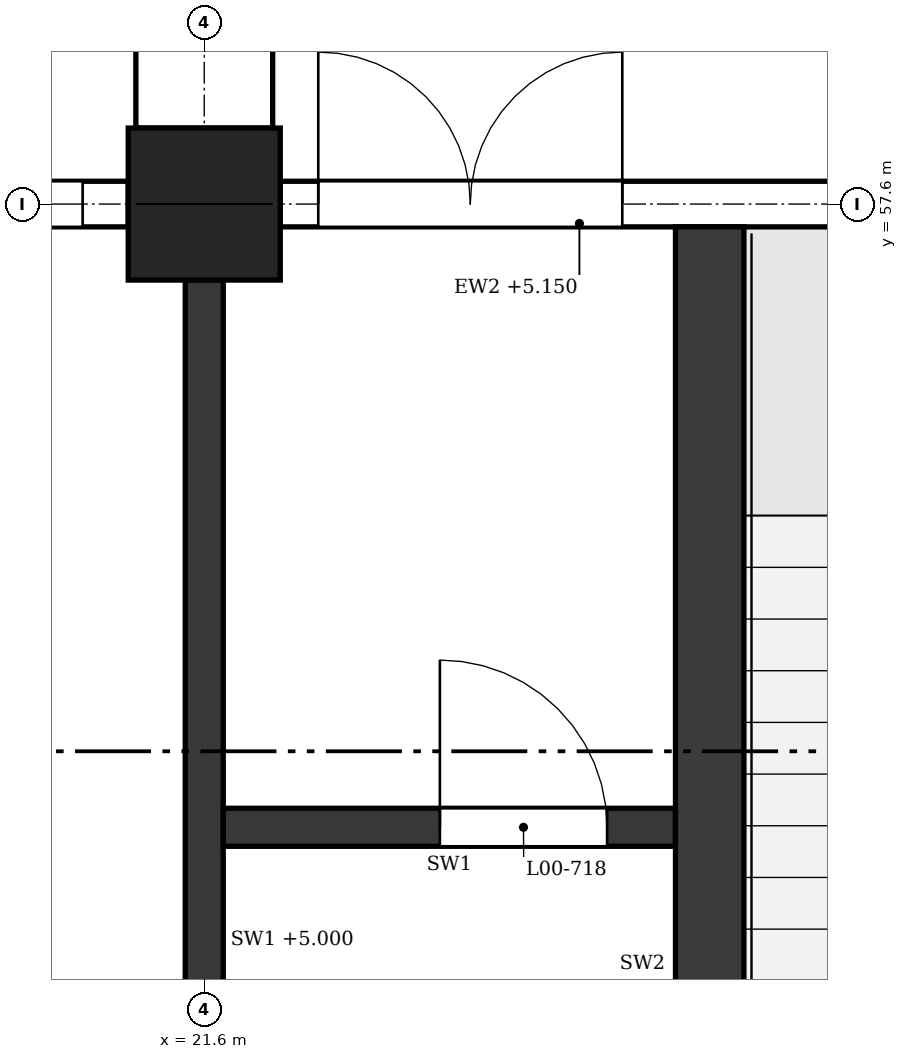
"""IFC4 building model, lengths in metres.
Left out: names, types, materials, properties, quantities, classifications, styles, units other than length and angle.
Written with IfcOpenShell. Run it as: python <this file> out.ifc"""

import sys

from ifc_helpers import new_model, si_unit, direction, frame, frame_2d, origin, origin_2d, place, context, subcontext, project, spatial, polyline, rectangle, outline, extrude, element, fill, save


model = new_model("IFC4")
c1 = context("Model", 3, precision=1e-05, world=origin(), true_north=direction((0.0, 1.0)))
c2 = subcontext(c1, "Body", "Model", "MODEL_VIEW")
j1 = project(units=[si_unit("LENGTHUNIT", "METRE"), si_unit("PLANEANGLEUNIT", "RADIAN")], contexts=[c1])
p1 = place(None, origin())
s1 = spatial("IfcSite", under=j1, at=p1, CompositionType="ELEMENT")
p2 = place(p1, origin())
s2 = spatial("IfcBuilding", under=s1, at=p2, CompositionType="ELEMENT")
p3 = place(p2, origin())
s3 = spatial("IfcBuildingStorey", under=s2, at=p3, CompositionType="ELEMENT", Elevation=0.0)
p4 = place(p3, frame((21.6, 57.6, 0.0), z_axis=(0.0, 0.0, 1.0), x_axis=(1.0, 0.0, 0.0)))
e1 = element("IfcColumn", 1, at=p4, inside=s3, PredefinedType="COLUMN", context=c2, shape_type="SweptSolid", body=[
    extrude(rectangle(XDim=1.0, YDim=1.0, at=origin_2d()), origin(), (0.0, 0.0, 1.0), 6.0),
])
p5 = place(p3, frame((28.3, 57.6, 0.0), z_axis=(0.0, 0.0, 1.0), x_axis=(-1.0, 0.0, 0.0)))
e2 = element("IfcWall", 2, at=p5, inside=s3, PredefinedType="STANDARD", context=c2, shape_type="SweptSolid", body=[
    extrude(rectangle(XDim=6.2, YDim=0.3, at=frame_2d((3.1, 0.0))), origin(), (0.0, 0.0, 1.0), 5.15),
])
p6 = place(p5, frame((3.95, 0.0, 0.0)))
e3 = element("IfcOpeningElement", 3, at=p6, cuts=e2, PredefinedType="OPENING", context=c2, shape_type="SweptSolid", body=[
    extrude(rectangle(XDim=2.0, YDim=2.1, at=frame_2d((1.0, 1.05))), frame((0.0, 0.16, 0.0), z_axis=(0.0, -1.0, 0.0), x_axis=(1.0, 0.0, 0.0)), (0.0, 0.0, 1.0), 0.32),
])
p7 = place(p5, frame((0.85, 0.0, 0.9)))
e4 = element("IfcOpeningElement", 4, at=p7, cuts=e2, PredefinedType="OPENING", context=c2, shape_type="SweptSolid", body=[
    extrude(outline(polyline([(0.0, 0.0), (0.9, 0.0), (0.9, 3.55), (0.45, 4.0), (0.0, 3.55), (0.0, 0.0)])), frame((0.0, 0.16, 0.0), z_axis=(0.0, -1.0, 0.0), x_axis=(1.0, 0.0, 0.0)), (0.0, 0.0, 1.0), 0.32),
])
p8 = place(p3, frame((21.1, 57.6, 0.0), z_axis=(0.0, 0.0, 1.0), x_axis=(-1.0, 0.0, 0.0)))
e5 = element("IfcWall", 5, at=p8, inside=s3, PredefinedType="STANDARD", context=c2, shape_type="SweptSolid", body=[
    extrude(rectangle(XDim=6.2, YDim=0.3, at=frame_2d((3.1, 0.0))), origin(), (0.0, 0.0, 1.0), 5.15),
])
p9 = place(p8, frame((0.3, 0.0, 0.9)))
e6 = element("IfcOpeningElement", 6, at=p9, cuts=e5, PredefinedType="OPENING", context=c2, shape_type="SweptSolid", body=[
    extrude(outline(polyline([(0.0, 0.0), (0.85, 0.0), (0.85, 3.55), (0.425, 4.0), (0.0, 3.55), (0.0, 0.0)])), frame((0.0, 0.16, 0.0), z_axis=(0.0, -1.0, 0.0), x_axis=(1.0, 0.0, 0.0)), (0.0, 0.0, 1.0), 0.32),
])
p10 = place(p8, frame((1.45, 0.0, 0.9)))
e7 = element("IfcOpeningElement", 7, at=p10, cuts=e5, PredefinedType="OPENING", context=c2, shape_type="SweptSolid", body=[
    extrude(outline(polyline([(0.0, 0.0), (0.85, 0.0), (0.85, 3.55), (0.425, 4.0), (0.0, 3.55), (0.0, 0.0)])), frame((0.0, 0.16, 0.0), z_axis=(0.0, -1.0, 0.0), x_axis=(1.0, 0.0, 0.0)), (0.0, 0.0, 1.0), 0.32),
])
p11 = place(p8, frame((3.9, 0.0, 0.9)))
e8 = element("IfcOpeningElement", 8, at=p11, cuts=e5, PredefinedType="OPENING", context=c2, shape_type="SweptSolid", body=[
    extrude(outline(polyline([(0.0, 0.0), (0.85, 0.0), (0.85, 3.55), (0.425, 4.0), (0.0, 3.55), (0.0, 0.0)])), frame((0.0, 0.16, 0.0), z_axis=(0.0, -1.0, 0.0), x_axis=(1.0, 0.0, 0.0)), (0.0, 0.0, 1.0), 0.32),
])
p12 = place(p8, frame((5.05, 0.0, 0.9)))
e9 = element("IfcOpeningElement", 9, at=p12, cuts=e5, PredefinedType="OPENING", context=c2, shape_type="SweptSolid", body=[
    extrude(outline(polyline([(0.0, 0.0), (0.85, 0.0), (0.85, 3.55), (0.425, 4.0), (0.0, 3.55), (0.0, 0.0)])), frame((0.0, 0.16, 0.0), z_axis=(0.0, -1.0, 0.0), x_axis=(1.0, 0.0, 0.0)), (0.0, 0.0, 1.0), 0.32),
])
p13 = place(p3, frame((21.6, 58.1, 0.0), z_axis=(0.0, 0.0, 1.0), x_axis=(0.0, 1.0, 0.0)))
e10 = element("IfcWall", 10, at=p13, inside=s3, PredefinedType="POLYGONAL", context=c2, shape_type="SweptSolid", body=[
    extrude(outline(polyline([(1.6, 0.0), (1.6, 20.9), (1.3, 21.35), (0.0, 21.35), (0.0, 0.0), (1.6, 0.0)])), frame((0.0, 0.45, 0.0), z_axis=(0.0, -1.0, 0.0), x_axis=(1.0, 0.0, 0.0)), (0.0, 0.0, 1.0), 0.9),
])
p14 = place(p3, frame((21.6, 50.9, 0.0), z_axis=(0.0, 0.0, 1.0), x_axis=(0.0, 1.0, 0.0)))
e11 = element("IfcWall", 11, at=p14, inside=s3, PredefinedType="SHEAR", context=c2, shape_type="SweptSolid", body=[
    extrude(rectangle(XDim=6.2, YDim=0.25, at=frame_2d((3.1, 0.0))), origin(), (0.0, 0.0, 1.0), 5.0),
])
p15 = place(p3, frame((24.925, 50.525, 0.0), z_axis=(0.0, 0.0, 1.0), x_axis=(0.0, 1.0, 0.0)))
e12 = element("IfcWall", 12, at=p15, inside=s3, PredefinedType="SHEAR", context=c2, shape_type="SweptSolid", body=[
    extrude(rectangle(XDim=6.925, YDim=0.45, at=frame_2d((3.462, 0.0))), origin(), (0.0, 0.0, 1.0), 5.75),
])
p16 = place(p15, frame((0.525, 0.0, 0.0)))
e13 = element("IfcOpeningElement", 13, at=p16, cuts=e12, PredefinedType="OPENING", context=c2, shape_type="SweptSolid", body=[
    extrude(rectangle(XDim=1.0, YDim=2.1, at=frame_2d((0.5, 1.05))), frame((0.0, 0.235, 0.0), z_axis=(0.0, -1.0, 0.0), x_axis=(1.0, 0.0, 0.0)), (0.0, 0.0, 1.0), 0.47),
])
p17 = place(p3, frame((21.725, 53.5, 0.0), z_axis=(0.0, 0.0, 1.0), x_axis=(1.0, 0.0, 0.0)))
e14 = element("IfcWall", 14, at=p17, inside=s3, PredefinedType="SHEAR", context=c2, shape_type="SweptSolid", body=[
    extrude(rectangle(XDim=2.975, YDim=0.25, at=frame_2d((1.487, 0.0))), origin(), (0.0, 0.0, 1.0), 5.75),
])
p18 = place(p17, frame((1.425, 0.0, 0.0)))
e15 = element("IfcOpeningElement", 15, at=p18, cuts=e14, PredefinedType="OPENING", context=c2, shape_type="SweptSolid", body=[
    extrude(rectangle(XDim=1.1, YDim=2.1, at=frame_2d((0.55, 1.05))), frame((0.0, 0.135, 0.0), z_axis=(0.0, -1.0, 0.0), x_axis=(1.0, 0.0, 0.0)), (0.0, 0.0, 1.0), 0.27),
])
p19 = place(p6, frame((2.0, 0.0, 0.0), z_axis=(0.0, 0.0, 1.0), x_axis=(-1.0, 0.0, 0.0)))
e16 = element("IfcDoor", 16, at=p19, inside=s3, OperationType="DOUBLE_DOOR_SINGLE_SWING", PredefinedType="DOOR", context=c2, shape_type="SweptSolid", body=[
    extrude(rectangle(XDim=2.0, YDim=2.1, at=frame_2d((1.0, 1.05))), frame((0.0, 0.025, 0.0), z_axis=(0.0, -1.0, 0.0), x_axis=(1.0, 0.0, 0.0)), (0.0, 0.0, 1.0), 0.05),
])
fill(e3, e16)
p20 = place(p9, origin())
e17 = element("IfcWindow", 17, at=p20, inside=s3, PartitioningType="SINGLE_PANEL", PredefinedType="WINDOW", context=c2, shape_type="SweptSolid", body=[
    extrude(outline(polyline([(0.0, 0.0), (0.85, 0.0), (0.85, 3.55), (0.425, 4.0), (0.0, 3.55), (0.0, 0.0)])), frame((0.0, 0.03, 0.0), z_axis=(0.0, -1.0, 0.0), x_axis=(1.0, 0.0, 0.0)), (0.0, 0.0, 1.0), 0.06),
])
fill(e6, e17)
p21 = place(p18, origin())
e18 = element("IfcDoor", 18, at=p21, inside=s3, OperationType="SINGLE_SWING_LEFT", PredefinedType="DOOR", context=c2, shape_type="SweptSolid", body=[
    extrude(rectangle(XDim=1.1, YDim=2.1, at=frame_2d((0.55, 1.05))), frame((0.0, 0.025, 0.0), z_axis=(0.0, -1.0, 0.0), x_axis=(1.0, 0.0, 0.0)), (0.0, 0.0, 1.0), 0.05),
])
fill(e15, e18)
save(model, sys.argv[1])
